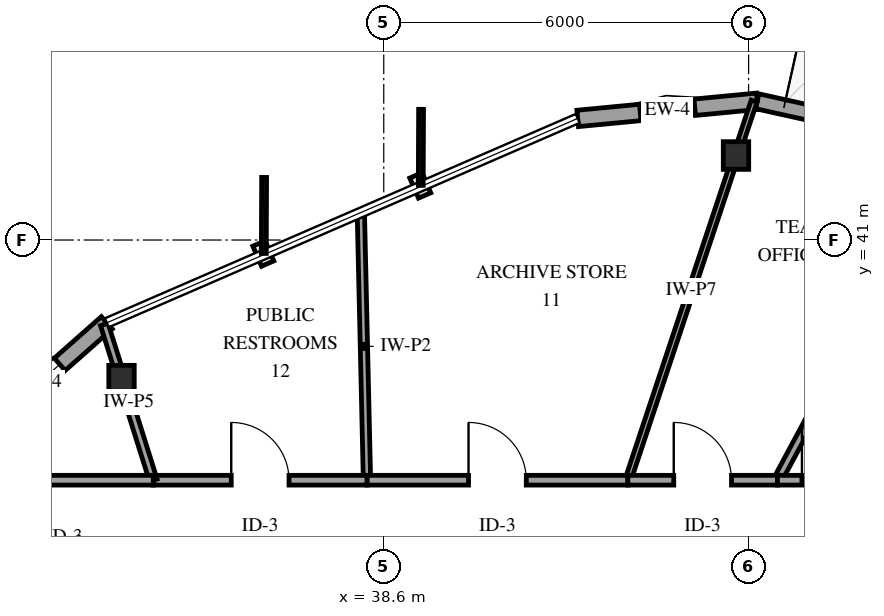
"""IFC4 building model, lengths in metres.
Left out: names, types, materials, properties, quantities, classifications, styles, units other than length and angle.
Written with IfcOpenShell. Run it as: python <this file> out.ifc"""

import sys

from ifc_helpers import new_model, si_unit, direction, frame, frame_2d, origin, origin_2d, place, context, subcontext, project, spatial, rectangle, i_section, extrude, element, fill, save


model = new_model("IFC4")
c1 = context("Model", 3, precision=1e-05, world=origin(), true_north=direction((0.0, 1.0)))
c2 = subcontext(c1, "Body", "Model", "MODEL_VIEW")
j1 = project(units=[si_unit("LENGTHUNIT", "METRE"), si_unit("PLANEANGLEUNIT", "RADIAN")], contexts=[c1])
p1 = place(None, origin())
s1 = spatial("IfcSite", under=j1, at=p1, CompositionType="ELEMENT")
p2 = place(p1, origin())
s2 = spatial("IfcBuilding", under=s1, at=p2, CompositionType="ELEMENT")
p3 = place(p2, frame((0.0, 0.0, 118.6)))
s3 = spatial("IfcBuildingStorey", under=s2, at=p3, CompositionType="ELEMENT", Elevation=118.6)
for number, where, z_axis, x_axis in (
    (1, (44.393, 42.389, 0.0), (0.0, 0.0, 1.0), (1.0, 0.0, 0.0)),
    (2, (34.288, 38.711, 0.0), (0.0, 0.0, 1.0), (1.0, 0.0, 0.0)),
):
    element("IfcColumn", number, at=place(p3, frame(where, z_axis=z_axis, x_axis=x_axis)), inside=s3, PredefinedType="COLUMN", context=c2, shape_type="SweptSolid", body=[
        extrude(i_section(OverallWidth=0.418, OverallDepth=0.455, WebThickness=0.042, FlangeThickness=0.068, FilletRadius=0.038, at=origin_2d()), origin(), (0.0, 0.0, 1.0), 3.9),
    ])
p4 = place(p3, frame((44.743, 43.282, 0.0), z_axis=(0.0, 0.0, 1.0), x_axis=(-0.995464349716, -0.095135316491, 0.0)))
e3 = element("IfcWall", 3, at=p4, inside=s3, PredefinedType="SOLIDWALL", context=c2, shape_type="SweptSolid", body=[
    extrude(rectangle(XDim=2.967, YDim=0.27, at=frame_2d((1.483, 0.0))), origin(), (0.0, 0.0, 1.0), 2.979),
])
p5 = place(p4, frame((1.033, 0.0, 0.75)))
e4 = element("IfcOpeningElement", 4, at=p5, cuts=e3, PredefinedType="OPENING", context=c2, shape_type="SweptSolid", body=[
    extrude(rectangle(XDim=0.9, YDim=1.5, at=frame_2d((0.45, 0.75))), frame((0.0, 0.145, 0.0), z_axis=(0.0, -1.0, 0.0), x_axis=(1.0, 0.0, 0.0)), (0.0, 0.0, 1.0), 0.29),
])
p6 = place(p3, frame((52.982, 41.449, 0.0), z_axis=(0.0, 0.0, 1.0), x_axis=(-0.976144167336, 0.217123385606, 0.0)))
e5 = element("IfcWall", 5, at=p6, inside=s3, PredefinedType="SOLIDWALL", context=c2, shape_type="SweptSolid", body=[
    extrude(rectangle(XDim=8.441, YDim=0.25, at=frame_2d((4.221, 0.0))), origin(), (0.0, 0.0, 1.0), 2.979),
])
p7 = place(p6, frame((3.721, 0.0, 0.0)))
e6 = element("IfcOpeningElement", 6, at=p7, cuts=e5, PredefinedType="OPENING", context=c2, shape_type="SweptSolid", body=[
    extrude(rectangle(XDim=1.05, YDim=2.15, at=frame_2d((0.525, 1.075))), frame((0.0, 0.135, 0.0), z_axis=(0.0, -1.0, 0.0), x_axis=(1.0, 0.0, 0.0)), (0.0, 0.0, 1.0), 0.27),
])
p8 = place(p6, frame((2.035, 0.0, 0.72)))
e7 = element("IfcOpeningElement", 7, at=p8, cuts=e5, PredefinedType="OPENING", context=c2, shape_type="SweptSolid", body=[
    extrude(rectangle(XDim=0.9, YDim=1.5, at=frame_2d((0.45, 0.75))), frame((0.0, 0.135, 0.0), z_axis=(0.0, -1.0, 0.0), x_axis=(1.0, 0.0, 0.0)), (0.0, 0.0, 1.0), 0.27),
])
p9 = place(p6, frame((5.642, 0.0, 0.72)))
e8 = element("IfcOpeningElement", 8, at=p9, cuts=e5, PredefinedType="OPENING", context=c2, shape_type="SweptSolid", body=[
    extrude(rectangle(XDim=1.2, YDim=1.6, at=frame_2d((0.6, 0.8))), frame((0.0, 0.135, 0.0), z_axis=(0.0, -1.0, 0.0), x_axis=(1.0, 0.0, 0.0)), (0.0, 0.0, 1.0), 0.27),
])
p10 = place(p3, frame((34.046, 39.639, 0.0), z_axis=(0.0, 0.0, 1.0), x_axis=(-0.749417401232, -0.662097846795, 0.0)))
e9 = element("IfcWall", 9, at=p10, inside=s3, PredefinedType="SOLIDWALL", context=c2, shape_type="SweptSolid", body=[
    extrude(rectangle(XDim=2.967, YDim=0.27, at=frame_2d((1.483, 0.0))), origin(), (0.0, 0.0, 1.0), 2.979),
])
p11 = place(p10, frame((1.033, 0.0, 0.75)))
e10 = element("IfcOpeningElement", 10, at=p11, cuts=e9, PredefinedType="OPENING", context=c2, shape_type="SweptSolid", body=[
    extrude(rectangle(XDim=0.9, YDim=1.5, at=frame_2d((0.45, 0.75))), frame((0.0, 0.145, 0.0), z_axis=(0.0, -1.0, 0.0), x_axis=(1.0, 0.0, 0.0)), (0.0, 0.0, 1.0), 0.29),
])
p12 = place(p3, frame((42.614, 37.05, 0.0), z_axis=(0.0, 0.0, 1.0), x_axis=(0.316038292766, 0.948746434779, 0.0)))
e11 = element("IfcWall", 11, at=p12, inside=s3, PredefinedType="PARTITIONING", context=c2, shape_type="SweptSolid", body=[
    extrude(rectangle(XDim=6.572, YDim=0.1, at=frame_2d((3.286, 0.0))), origin(), (0.0, 0.0, 1.0), 2.895),
])
p13 = place(p3, frame((45.074, 37.05, 0.0), z_axis=(0.0, 0.0, 1.0), x_axis=(0.473353633423, 0.880872486644, 0.0)))
e12 = element("IfcWall", 12, at=p13, inside=s3, PredefinedType="PARTITIONING", context=c2, shape_type="SweptSolid", body=[
    extrude(rectangle(XDim=6.245, YDim=0.14, at=frame_2d((3.123, 0.0))), origin(), (0.0, 0.0, 1.0), 3.6),
])
p14 = place(p3, frame((38.324, 37.05, 0.0), z_axis=(0.0, 0.0, 1.0), x_axis=(-0.022955679658, 0.999736483665, 0.0)))
e13 = element("IfcWall", 13, at=p14, inside=s3, PredefinedType="PARTITIONING", context=c2, shape_type="SweptSolid", body=[
    extrude(rectangle(XDim=4.403, YDim=0.12, at=frame_2d((2.202, 0.0))), origin(), (0.0, 0.0, 1.0), 3.6),
])
p15 = place(p3, frame((38.324, 37.05, 0.0), z_axis=(0.0, 0.0, 1.0), x_axis=(1.0, 0.0, 0.0)))
e14 = element("IfcWall", 14, at=p15, inside=s3, PredefinedType="PARTITIONING", context=c2, shape_type="SweptSolid", body=[
    extrude(rectangle(XDim=4.29, YDim=0.16, at=frame_2d((2.145, 0.0))), origin(), (0.0, 0.0, 1.0), 3.6),
])
p16 = place(p15, frame((1.67, 0.0, 0.0)))
e15 = element("IfcOpeningElement", 15, at=p16, cuts=e14, PredefinedType="OPENING", context=c2, shape_type="SweptSolid", body=[
    extrude(rectangle(XDim=0.95, YDim=2.15, at=frame_2d((0.475, 1.075))), frame((0.0, 0.09, 0.0), z_axis=(0.0, -1.0, 0.0), x_axis=(1.0, 0.0, 0.0)), (0.0, 0.0, 1.0), 0.18),
])
p17 = place(p3, frame((34.81, 37.05, 0.0), z_axis=(0.0, 0.0, 1.0), x_axis=(1.0, 0.0, 0.0)))
e16 = element("IfcWall", 16, at=p17, inside=s3, PredefinedType="PARTITIONING", context=c2, shape_type="SweptSolid", body=[
    extrude(rectangle(XDim=3.514, YDim=0.16, at=frame_2d((1.757, 0.0))), origin(), (0.0, 0.0, 1.0), 3.6),
])
p18 = place(p17, frame((1.282, 0.0, 0.0)))
e17 = element("IfcOpeningElement", 17, at=p18, cuts=e16, PredefinedType="OPENING", context=c2, shape_type="SweptSolid", body=[
    extrude(rectangle(XDim=0.95, YDim=2.15, at=frame_2d((0.475, 1.075))), frame((0.0, 0.09, 0.0), z_axis=(0.0, -1.0, 0.0), x_axis=(1.0, 0.0, 0.0)), (0.0, 0.0, 1.0), 0.18),
])
p19 = place(p3, frame((34.81, 37.05, 0.0), z_axis=(0.0, 0.0, 1.0), x_axis=(-0.300148034825, 0.953892633995, 0.0)))
e18 = element("IfcWall", 18, at=p19, inside=s3, PredefinedType="PARTITIONING", context=c2, shape_type="SweptSolid", body=[
    extrude(rectangle(XDim=2.686, YDim=0.13, at=frame_2d((1.343, 0.0))), origin(), (0.0, 0.0, 1.0), 2.895),
])
p20 = place(p3, frame((42.614, 37.05, 0.0), z_axis=(0.0, 0.0, 1.0), x_axis=(1.0, 0.0, 0.0)))
e19 = element("IfcWall", 19, at=p20, inside=s3, PredefinedType="PARTITIONING", context=c2, shape_type="SweptSolid", body=[
    extrude(rectangle(XDim=2.46, YDim=0.16, at=frame_2d((1.23, 0.0))), origin(), (0.0, 0.0, 1.0), 3.6),
])
p21 = place(p20, frame((0.755, 0.0, 0.0)))
e20 = element("IfcOpeningElement", 20, at=p21, cuts=e19, PredefinedType="OPENING", context=c2, shape_type="SweptSolid", body=[
    extrude(rectangle(XDim=0.95, YDim=2.15, at=frame_2d((0.475, 1.075))), frame((0.0, 0.09, 0.0), z_axis=(0.0, -1.0, 0.0), x_axis=(1.0, 0.0, 0.0)), (0.0, 0.0, 1.0), 0.18),
])
p22 = place(p3, frame((32.67, 37.05, 0.0), z_axis=(0.0, 0.0, 1.0), x_axis=(1.0, 0.0, 0.0)))
e21 = element("IfcWall", 21, at=p22, inside=s3, PredefinedType="PARTITIONING", context=c2, shape_type="SweptSolid", body=[
    extrude(rectangle(XDim=2.14, YDim=0.16, at=frame_2d((1.07, 0.0))), origin(), (0.0, 0.0, 1.0), 3.6),
])
p23 = place(p3, frame((45.074, 37.05, 0.0), z_axis=(0.0, 0.0, 1.0), x_axis=(1.0, 0.0, 0.0)))
e22 = element("IfcWall", 22, at=p23, inside=s3, PredefinedType="PARTITIONING", context=c2, shape_type="SweptSolid", body=[
    extrude(rectangle(XDim=1.506, YDim=0.16, at=frame_2d((0.753, 0.0))), origin(), (0.0, 0.0, 1.0), 3.6),
])
p24 = place(p23, frame((0.403, 0.0, 0.0)))
e23 = element("IfcOpeningElement", 23, at=p24, cuts=e22, PredefinedType="OPENING", context=c2, shape_type="SweptSolid", body=[
    extrude(rectangle(XDim=0.85, YDim=2.1, at=frame_2d((0.425, 1.05))), frame((0.0, 0.09, 0.0), z_axis=(0.0, -1.0, 0.0), x_axis=(1.0, 0.0, 0.0)), (0.0, 0.0, 1.0), 0.18),
])
p25 = place(p5, origin())
e24 = element("IfcWindow", 24, at=p25, inside=s3, PartitioningType="SINGLE_PANEL", PredefinedType="WINDOW", context=c2, shape_type="SweptSolid", body=[
    extrude(rectangle(XDim=0.9, YDim=1.5, at=frame_2d((0.45, 0.75))), frame((0.0, 0.03, 0.0), z_axis=(0.0, -1.0, 0.0), x_axis=(1.0, 0.0, 0.0)), (0.0, 0.0, 1.0), 0.06),
])
fill(e4, e24)
p26 = place(p11, origin())
e25 = element("IfcWindow", 25, at=p26, inside=s3, PartitioningType="SINGLE_PANEL", PredefinedType="WINDOW", context=c2, shape_type="SweptSolid", body=[
    extrude(rectangle(XDim=0.9, YDim=1.5, at=frame_2d((0.45, 0.75))), frame((0.0, 0.03, 0.0), z_axis=(0.0, -1.0, 0.0), x_axis=(1.0, 0.0, 0.0)), (0.0, 0.0, 1.0), 0.06),
])
fill(e10, e25)
p27 = place(p16, origin())
e26 = element("IfcDoor", 26, at=p27, inside=s3, OperationType="SINGLE_SWING_LEFT", PredefinedType="DOOR", context=c2, shape_type="SweptSolid", body=[
    extrude(rectangle(XDim=0.95, YDim=2.15, at=frame_2d((0.475, 1.075))), frame((0.0, 0.025, 0.0), z_axis=(0.0, -1.0, 0.0), x_axis=(1.0, 0.0, 0.0)), (0.0, 0.0, 1.0), 0.05),
])
fill(e15, e26)
p28 = place(p18, origin())
e27 = element("IfcDoor", 27, at=p28, inside=s3, OperationType="SINGLE_SWING_LEFT", PredefinedType="DOOR", context=c2, shape_type="SweptSolid", body=[
    extrude(rectangle(XDim=0.95, YDim=2.15, at=frame_2d((0.475, 1.075))), frame((0.0, 0.025, 0.0), z_axis=(0.0, -1.0, 0.0), x_axis=(1.0, 0.0, 0.0)), (0.0, 0.0, 1.0), 0.05),
])
fill(e17, e27)
p29 = place(p21, origin())
e28 = element("IfcDoor", 28, at=p29, inside=s3, OperationType="SINGLE_SWING_LEFT", PredefinedType="DOOR", context=c2, shape_type="SweptSolid", body=[
    extrude(rectangle(XDim=0.95, YDim=2.15, at=frame_2d((0.475, 1.075))), frame((0.0, 0.025, 0.0), z_axis=(0.0, -1.0, 0.0), x_axis=(1.0, 0.0, 0.0)), (0.0, 0.0, 1.0), 0.05),
])
fill(e20, e28)
p30 = place(p24, origin())
e29 = element("IfcDoor", 29, at=p30, inside=s3, OperationType="SINGLE_SWING_LEFT", PredefinedType="DOOR", context=c2, shape_type="SweptSolid", body=[
    extrude(rectangle(XDim=0.85, YDim=2.1, at=frame_2d((0.425, 1.05))), frame((0.0, 0.025, 0.0), z_axis=(0.0, -1.0, 0.0), x_axis=(1.0, 0.0, 0.0)), (0.0, 0.0, 1.0), 0.05),
])
fill(e23, e29)
save(model, sys.argv[1])
